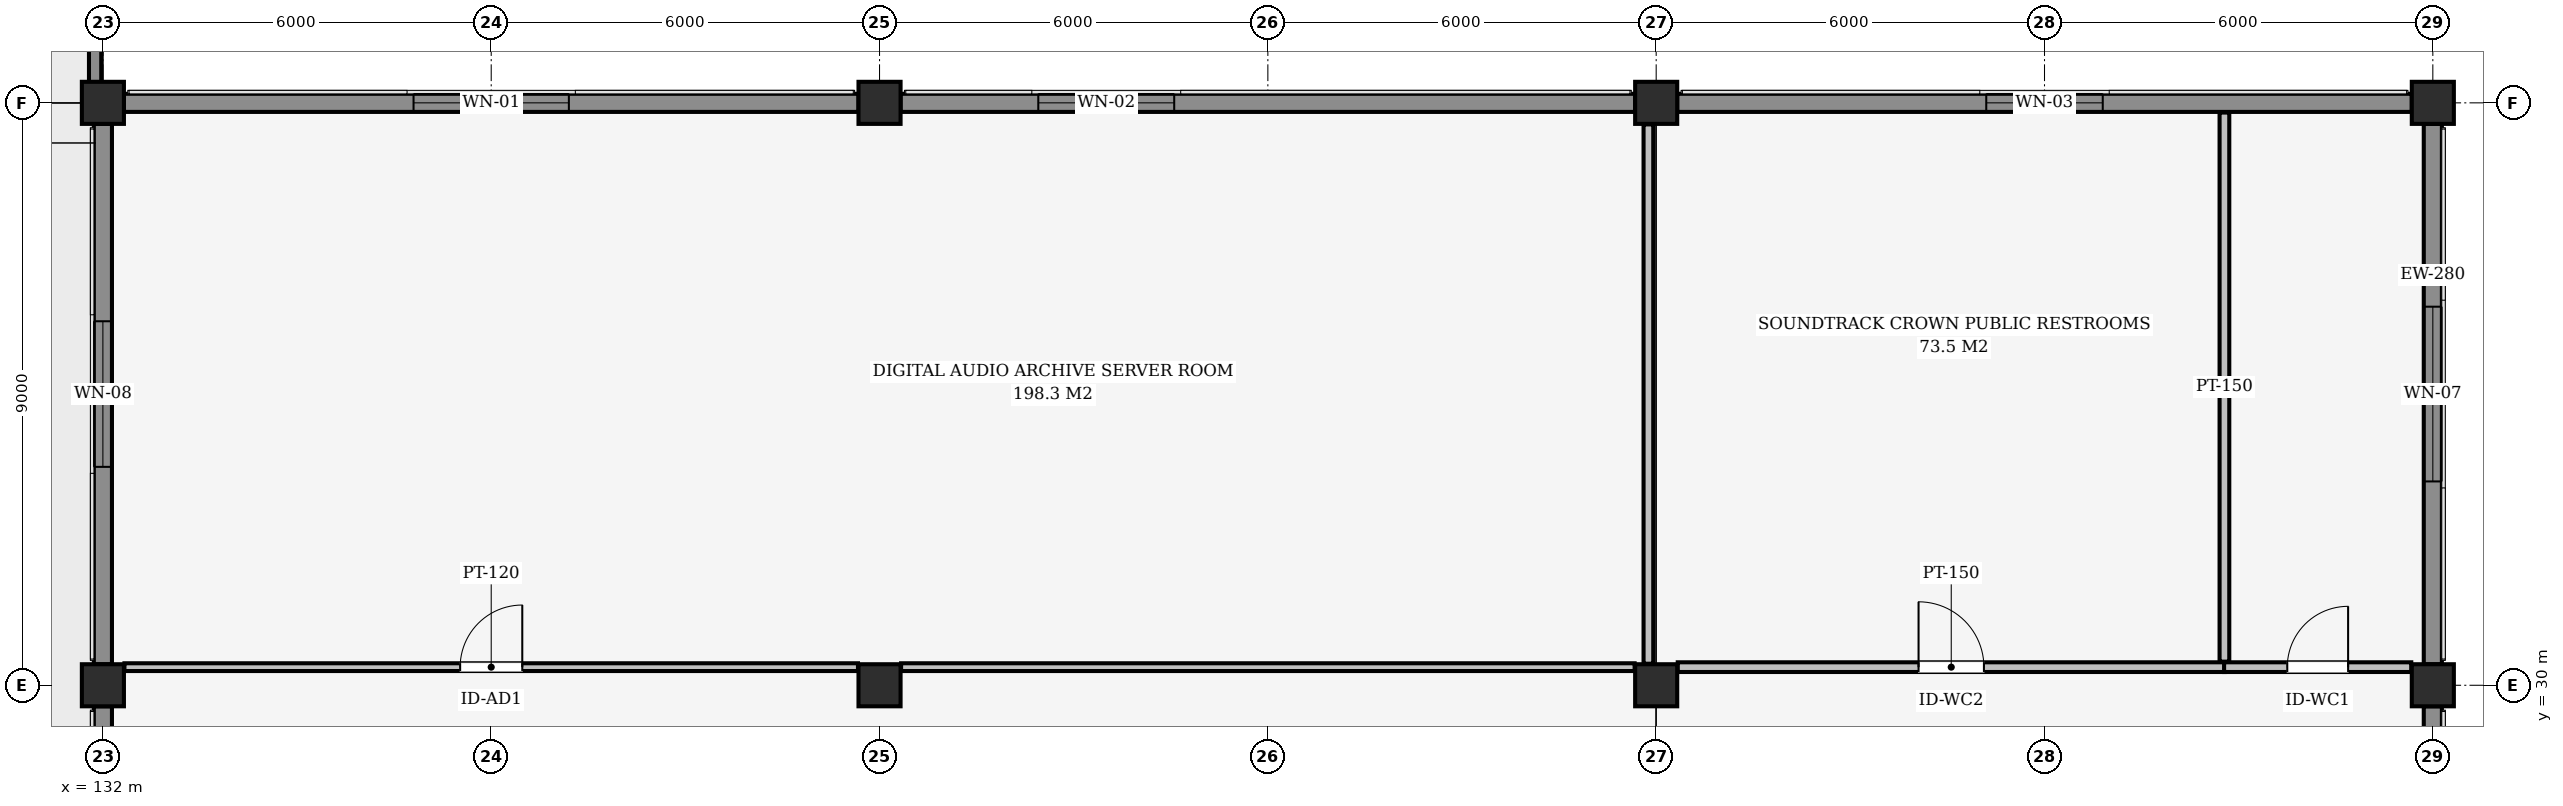
"""IFC4 building model, lengths in metres.
Left out: names, types, materials, properties, quantities, classifications, styles, units other than length and angle.
Written with IfcOpenShell. Run it as: python <this file> out.ifc"""

import sys

from ifc_helpers import new_model, si_unit, direction, frame, frame_2d, origin, origin_2d, place, context, subcontext, project, spatial, rectangle, extrude, element, fill, save


model = new_model("IFC4")
c1 = context("Model", 3, precision=1e-05, world=origin(), true_north=direction((0.0, 1.0)))
c2 = subcontext(c1, "Body", "Model", "MODEL_VIEW")
j1 = project(units=[si_unit("LENGTHUNIT", "METRE"), si_unit("PLANEANGLEUNIT", "RADIAN")], contexts=[c1])
p1 = place(None, origin())
s1 = spatial("IfcSite", under=j1, at=p1, CompositionType="ELEMENT")
p2 = place(p1, origin())
s2 = spatial("IfcBuilding", under=s1, at=p2, CompositionType="ELEMENT")
p3 = place(p2, frame((0.0, 0.0, 18.3)))
s3 = spatial("IfcBuildingStorey", under=s2, at=p3, CompositionType="ELEMENT", Elevation=18.3)
for number, where, z_axis, x_axis in (
    (1, (132.0, 30.0, 0.0), (0.0, 0.0, 1.0), (1.0, 0.0, 0.0)),
    (2, (132.0, 39.0, 0.0), (0.0, 0.0, 1.0), (1.0, 0.0, 0.0)),
    (3, (144.0, 30.0, 0.0), (0.0, 0.0, 1.0), (1.0, 0.0, 0.0)),
    (4, (144.0, 39.0, 0.0), (0.0, 0.0, 1.0), (1.0, 0.0, 0.0)),
    (5, (156.0, 30.0, 0.0), (0.0, 0.0, 1.0), (1.0, 0.0, 0.0)),
    (6, (156.0, 39.0, 0.0), (0.0, 0.0, 1.0), (1.0, 0.0, 0.0)),
    (7, (168.0, 30.0, 0.0), (0.0, 0.0, 1.0), (1.0, 0.0, 0.0)),
    (8, (168.0, 39.0, 0.0), (0.0, 0.0, 1.0), (1.0, 0.0, 0.0)),
):
    element("IfcColumn", number, at=place(p3, frame(where, z_axis=z_axis, x_axis=x_axis)), inside=s3, PredefinedType="COLUMN", context=c2, shape_type="SweptSolid", body=[
        extrude(rectangle(XDim=0.65, YDim=0.65, at=origin_2d()), origin(), (0.0, 0.0, 1.0), 3.9),
    ])
p4 = place(p3, frame((132.325, 39.0, 0.0), z_axis=(0.0, 0.0, 1.0), x_axis=(1.0, 0.0, 0.0)))
e9 = element("IfcWall", 9, at=p4, inside=s3, PredefinedType="SOLIDWALL", context=c2, shape_type="SweptSolid", body=[
    extrude(rectangle(XDim=11.35, YDim=0.28, at=frame_2d((5.675, 0.0))), origin(), (0.0, 0.0, 1.0), 3.269),
])
p5 = place(p4, frame((4.475, 0.0, 0.85)))
e10 = element("IfcOpeningElement", 10, at=p5, cuts=e9, PredefinedType="OPENING", context=c2, shape_type="SweptSolid", body=[
    extrude(rectangle(XDim=2.4, YDim=1.8, at=frame_2d((1.2, 0.9))), frame((0.0, 0.15, 0.0), z_axis=(0.0, -1.0, 0.0), x_axis=(1.0, 0.0, 0.0)), (0.0, 0.0, 1.0), 0.3),
])
p6 = place(p3, frame((144.325, 39.0, 0.0), z_axis=(0.0, 0.0, 1.0), x_axis=(1.0, 0.0, 0.0)))
e11 = element("IfcWall", 11, at=p6, inside=s3, PredefinedType="SOLIDWALL", context=c2, shape_type="SweptSolid", body=[
    extrude(rectangle(XDim=11.35, YDim=0.28, at=frame_2d((5.675, 0.0))), origin(), (0.0, 0.0, 1.0), 3.269),
])
p7 = place(p6, frame((2.128, 0.0, 0.85)))
e12 = element("IfcOpeningElement", 12, at=p7, cuts=e11, PredefinedType="OPENING", context=c2, shape_type="SweptSolid", body=[
    extrude(rectangle(XDim=2.1, YDim=1.8, at=frame_2d((1.05, 0.9))), frame((0.0, 0.15, 0.0), z_axis=(0.0, -1.0, 0.0), x_axis=(1.0, 0.0, 0.0)), (0.0, 0.0, 1.0), 0.3),
])
p8 = place(p3, frame((156.325, 39.0, 0.0), z_axis=(0.0, 0.0, 1.0), x_axis=(1.0, 0.0, 0.0)))
e13 = element("IfcWall", 13, at=p8, inside=s3, PredefinedType="SOLIDWALL", context=c2, shape_type="SweptSolid", body=[
    extrude(rectangle(XDim=11.35, YDim=0.28, at=frame_2d((5.675, 0.0))), origin(), (0.0, 0.0, 1.0), 3.269),
])
p9 = place(p8, frame((4.775, 0.0, 0.85)))
e14 = element("IfcOpeningElement", 14, at=p9, cuts=e13, PredefinedType="OPENING", context=c2, shape_type="SweptSolid", body=[
    extrude(rectangle(XDim=1.8, YDim=1.65, at=frame_2d((0.9, 0.825))), frame((0.0, 0.15, 0.0), z_axis=(0.0, -1.0, 0.0), x_axis=(1.0, 0.0, 0.0)), (0.0, 0.0, 1.0), 0.3),
])
p10 = place(p3, frame((168.0, 29.675, 0.0), z_axis=(0.0, 0.0, 1.0), x_axis=(0.0, -1.0, 0.0)))
e15 = element("IfcWall", 15, at=p10, inside=s3, PredefinedType="SOLIDWALL", context=c2, shape_type="SweptSolid", body=[
    extrude(rectangle(XDim=5.35, YDim=0.28, at=frame_2d((2.675, 0.0))), origin(), (0.0, 0.0, 1.0), 3.268),
])
p11 = place(p10, frame((2.0, 0.0, 0.85)))
e16 = element("IfcOpeningElement", 16, at=p11, cuts=e15, PredefinedType="OPENING", context=c2, shape_type="SweptSolid", body=[
    extrude(rectangle(XDim=1.35, YDim=1.5, at=frame_2d((0.675, 0.75))), frame((0.0, 0.15, 0.0), z_axis=(0.0, -1.0, 0.0), x_axis=(1.0, 0.0, 0.0)), (0.0, 0.0, 1.0), 0.3),
])
p12 = place(p3, frame((132.0, 24.325, 0.0), z_axis=(0.0, 0.0, 1.0), x_axis=(0.0, 1.0, 0.0)))
e17 = element("IfcWall", 17, at=p12, inside=s3, PredefinedType="SOLIDWALL", context=c2, shape_type="SweptSolid", body=[
    extrude(rectangle(XDim=5.35, YDim=0.28, at=frame_2d((2.675, 0.0))), origin(), (0.0, 0.0, 1.0), 3.268),
])
p13 = place(p12, frame((2.075, 0.0, 0.85)))
e18 = element("IfcOpeningElement", 18, at=p13, cuts=e17, PredefinedType="OPENING", context=c2, shape_type="SweptSolid", body=[
    extrude(rectangle(XDim=1.2, YDim=1.5, at=frame_2d((0.6, 0.75))), frame((0.0, 0.15, 0.0), z_axis=(0.0, -1.0, 0.0), x_axis=(1.0, 0.0, 0.0)), (0.0, 0.0, 1.0), 0.3),
])
p14 = place(p3, frame((168.0, 38.675, 0.0), z_axis=(0.0, 0.0, 1.0), x_axis=(0.0, -1.0, 0.0)))
e19 = element("IfcWall", 19, at=p14, inside=s3, PredefinedType="SOLIDWALL", context=c2, shape_type="SweptSolid", body=[
    extrude(rectangle(XDim=8.35, YDim=0.28, at=frame_2d((4.175, 0.0))), origin(), (0.0, 0.0, 1.0), 3.269),
])
p15 = place(p14, frame((2.825, 0.0, 0.85)))
e20 = element("IfcOpeningElement", 20, at=p15, cuts=e19, PredefinedType="OPENING", context=c2, shape_type="SweptSolid", body=[
    extrude(rectangle(XDim=2.7, YDim=1.95, at=frame_2d((1.35, 0.975))), frame((0.0, 0.15, 0.0), z_axis=(0.0, -1.0, 0.0), x_axis=(1.0, 0.0, 0.0)), (0.0, 0.0, 1.0), 0.3),
])
p16 = place(p3, frame((132.0, 30.325, 0.0), z_axis=(0.0, 0.0, 1.0), x_axis=(0.0, 1.0, 0.0)))
e21 = element("IfcWall", 21, at=p16, inside=s3, PredefinedType="SOLIDWALL", context=c2, shape_type="SweptSolid", body=[
    extrude(rectangle(XDim=8.35, YDim=0.28, at=frame_2d((4.175, 0.0))), origin(), (0.0, 0.0, 1.0), 3.269),
])
p17 = place(p16, frame((3.05, 0.0, 0.85)))
e22 = element("IfcOpeningElement", 22, at=p17, cuts=e21, PredefinedType="OPENING", context=c2, shape_type="SweptSolid", body=[
    extrude(rectangle(XDim=2.25, YDim=1.95, at=frame_2d((1.125, 0.975))), frame((0.0, 0.15, 0.0), z_axis=(0.0, -1.0, 0.0), x_axis=(1.0, 0.0, 0.0)), (0.0, 0.0, 1.0), 0.3),
])
p18 = place(p3, frame((131.88, 39.12, 0.06), z_axis=(0.0, 0.0, 1.0), x_axis=(0.0, 1.0, 0.0)))
e23 = element("IfcWall", 23, at=p18, inside=s3, PredefinedType="PARAPET", context=c2, shape_type="SweptSolid", body=[
    extrude(rectangle(XDim=34.58, YDim=0.19, at=frame_2d((17.29, 0.0))), origin(), (0.0, 0.0, 1.0), 0.6),
])
p19 = place(p3, frame((132.333, 30.28, 0.0), z_axis=(0.0, 0.0, 1.0), x_axis=(1.0, 0.0, 0.0)))
e24 = element("IfcWall", 24, at=p19, inside=s3, PredefinedType="PARTITIONING", context=c2, shape_type="SweptSolid", body=[
    extrude(rectangle(XDim=11.334, YDim=0.12, at=frame_2d((5.667, 0.0))), origin(), (0.0, 0.0, 1.0), 3.269),
])
p20 = place(p19, frame((5.187, 0.0, 0.0)))
e25 = element("IfcOpeningElement", 25, at=p20, cuts=e24, PredefinedType="OPENING", context=c2, shape_type="SweptSolid", body=[
    extrude(rectangle(XDim=0.96, YDim=2.16, at=frame_2d((0.48, 1.08))), frame((0.0, 0.07, 0.0), z_axis=(0.0, -1.0, 0.0), x_axis=(1.0, 0.0, 0.0)), (0.0, 0.0, 1.0), 0.14),
])
p21 = place(p3, frame((144.333, 30.28, 0.0), z_axis=(0.0, 0.0, 1.0), x_axis=(1.0, 0.0, 0.0)))
e26 = element("IfcWall", 26, at=p21, inside=s3, PredefinedType="PARTITIONING", context=c2, shape_type="SweptSolid", body=[
    extrude(rectangle(XDim=11.334, YDim=0.12, at=frame_2d((5.667, 0.0))), origin(), (0.0, 0.0, 1.0), 3.269),
])
p22 = place(p3, frame((156.333, 30.28, 0.0), z_axis=(0.0, 0.0, 1.0), x_axis=(1.0, 0.0, 0.0)))
e27 = element("IfcWall", 27, at=p22, inside=s3, PredefinedType="PARTITIONING", context=c2, shape_type="SweptSolid", body=[
    extrude(rectangle(XDim=8.452, YDim=0.15, at=frame_2d((4.226, 0.0))), origin(), (0.0, 0.0, 1.0), 3.269),
])
p23 = place(p22, frame((3.721, 0.0, 0.0)))
e28 = element("IfcOpeningElement", 28, at=p23, cuts=e27, PredefinedType="OPENING", context=c2, shape_type="SweptSolid", body=[
    extrude(rectangle(XDim=1.01, YDim=2.1, at=frame_2d((0.505, 1.05))), frame((0.0, 0.085, 0.0), z_axis=(0.0, -1.0, 0.0), x_axis=(1.0, 0.0, 0.0)), (0.0, 0.0, 1.0), 0.17),
])
p24 = place(p3, frame((164.775, 30.28, 0.0), z_axis=(0.0, 0.0, 1.0), x_axis=(1.0, 0.0, 0.0)))
e29 = element("IfcWall", 29, at=p24, inside=s3, PredefinedType="PARTITIONING", context=c2, shape_type="SweptSolid", body=[
    extrude(rectangle(XDim=2.892, YDim=0.15, at=frame_2d((1.446, 0.0))), origin(), (0.0, 0.0, 1.0), 3.269),
])
p25 = place(p24, frame((0.976, 0.0, 0.0)))
e30 = element("IfcOpeningElement", 30, at=p25, cuts=e29, PredefinedType="OPENING", context=c2, shape_type="SweptSolid", body=[
    extrude(rectangle(XDim=0.94, YDim=2.1, at=frame_2d((0.47, 1.05))), frame((0.0, 0.085, 0.0), z_axis=(0.0, -1.0, 0.0), x_axis=(1.0, 0.0, 0.0)), (0.0, 0.0, 1.0), 0.17),
])
p26 = place(p3, frame((155.88, 30.333, 0.0), z_axis=(0.0, 0.0, 1.0), x_axis=(0.0, 1.0, 0.0)))
e31 = element("IfcWall", 31, at=p26, inside=s3, PredefinedType="PARTITIONING", context=c2, shape_type="SweptSolid", body=[
    extrude(rectangle(XDim=8.334, YDim=0.15, at=frame_2d((4.167, 0.0))), origin(), (0.0, 0.0, 1.0), 3.269),
])
p27 = place(p3, frame((164.78, 30.365, 0.0), z_axis=(0.0, 0.0, 1.0), x_axis=(0.0, 1.0, 0.0)))
e32 = element("IfcWall", 32, at=p27, inside=s3, PredefinedType="PARTITIONING", context=c2, shape_type="SweptSolid", body=[
    extrude(rectangle(XDim=8.485, YDim=0.15, at=frame_2d((4.243, 0.0))), origin(), (0.0, 0.0, 1.0), 3.9),
])
p28 = place(p5, origin())
e33 = element("IfcWindow", 33, at=p28, inside=s3, PartitioningType="SINGLE_PANEL", PredefinedType="WINDOW", context=c2, shape_type="SweptSolid", body=[
    extrude(rectangle(XDim=2.4, YDim=1.8, at=frame_2d((1.2, 0.9))), frame((0.0, 0.03, 0.0), z_axis=(0.0, -1.0, 0.0), x_axis=(1.0, 0.0, 0.0)), (0.0, 0.0, 1.0), 0.06),
])
fill(e10, e33)
p29 = place(p7, origin())
e34 = element("IfcWindow", 34, at=p29, inside=s3, PartitioningType="SINGLE_PANEL", PredefinedType="WINDOW", context=c2, shape_type="SweptSolid", body=[
    extrude(rectangle(XDim=2.1, YDim=1.8, at=frame_2d((1.05, 0.9))), frame((0.0, 0.03, 0.0), z_axis=(0.0, -1.0, 0.0), x_axis=(1.0, 0.0, 0.0)), (0.0, 0.0, 1.0), 0.06),
])
fill(e12, e34)
p30 = place(p9, origin())
e35 = element("IfcWindow", 35, at=p30, inside=s3, PartitioningType="SINGLE_PANEL", PredefinedType="WINDOW", context=c2, shape_type="SweptSolid", body=[
    extrude(rectangle(XDim=1.8, YDim=1.65, at=frame_2d((0.9, 0.825))), frame((0.0, 0.03, 0.0), z_axis=(0.0, -1.0, 0.0), x_axis=(1.0, 0.0, 0.0)), (0.0, 0.0, 1.0), 0.06),
])
fill(e14, e35)
p31 = place(p15, origin())
e36 = element("IfcWindow", 36, at=p31, inside=s3, PartitioningType="SINGLE_PANEL", PredefinedType="WINDOW", context=c2, shape_type="SweptSolid", body=[
    extrude(rectangle(XDim=2.7, YDim=1.95, at=frame_2d((1.35, 0.975))), frame((0.0, 0.03, 0.0), z_axis=(0.0, -1.0, 0.0), x_axis=(1.0, 0.0, 0.0)), (0.0, 0.0, 1.0), 0.06),
])
fill(e20, e36)
p32 = place(p17, origin())
e37 = element("IfcWindow", 37, at=p32, inside=s3, PartitioningType="SINGLE_PANEL", PredefinedType="WINDOW", context=c2, shape_type="SweptSolid", body=[
    extrude(rectangle(XDim=2.25, YDim=1.95, at=frame_2d((1.125, 0.975))), frame((0.0, 0.03, 0.0), z_axis=(0.0, -1.0, 0.0), x_axis=(1.0, 0.0, 0.0)), (0.0, 0.0, 1.0), 0.06),
])
fill(e22, e37)
p33 = place(p20, origin())
e38 = element("IfcDoor", 38, at=p33, inside=s3, OperationType="SINGLE_SWING_RIGHT", PredefinedType="DOOR", context=c2, shape_type="SweptSolid", body=[
    extrude(rectangle(XDim=0.96, YDim=2.16, at=frame_2d((0.48, 1.08))), frame((0.0, 0.025, 0.0), z_axis=(0.0, -1.0, 0.0), x_axis=(1.0, 0.0, 0.0)), (0.0, 0.0, 1.0), 0.05),
])
fill(e25, e38)
p34 = place(p23, origin())
e39 = element("IfcDoor", 39, at=p34, inside=s3, OperationType="SINGLE_SWING_LEFT", PredefinedType="DOOR", context=c2, shape_type="SweptSolid", body=[
    extrude(rectangle(XDim=1.01, YDim=2.1, at=frame_2d((0.505, 1.05))), frame((0.0, 0.025, 0.0), z_axis=(0.0, -1.0, 0.0), x_axis=(1.0, 0.0, 0.0)), (0.0, 0.0, 1.0), 0.05),
])
fill(e28, e39)
p35 = place(p25, origin())
e40 = element("IfcDoor", 40, at=p35, inside=s3, OperationType="SINGLE_SWING_RIGHT", PredefinedType="DOOR", context=c2, shape_type="SweptSolid", body=[
    extrude(rectangle(XDim=0.94, YDim=2.1, at=frame_2d((0.47, 1.05))), frame((0.0, 0.025, 0.0), z_axis=(0.0, -1.0, 0.0), x_axis=(1.0, 0.0, 0.0)), (0.0, 0.0, 1.0), 0.05),
])
fill(e30, e40)
save(model, sys.argv[1])
